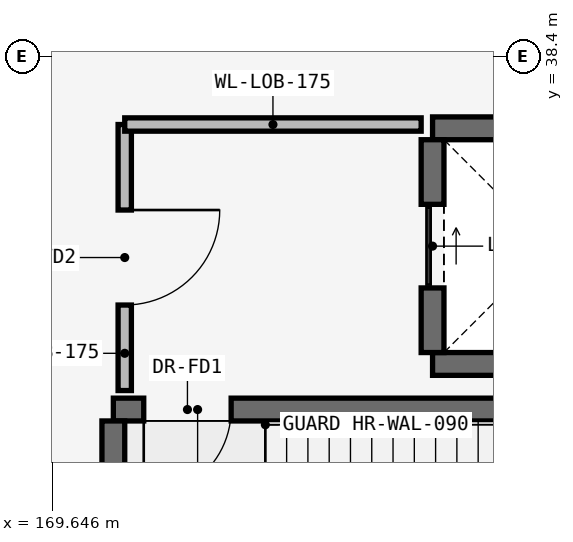
"""IFC4 building model, lengths in metres.
Left out: names, types, materials, properties, quantities, classifications, styles, units other than length and angle.
Written with IfcOpenShell. Run it as: python <this file> out.ifc"""

import sys

from ifc_helpers import new_model, si_unit, direction, frame, frame_2d, origin, place, context, subcontext, project, spatial, rectangle, extrude, element, fill, save


model = new_model("IFC4")
c1 = context("Model", 3, precision=1e-05, world=origin(), true_north=direction((0.0, 1.0)))
c2 = subcontext(c1, "Body", "Model", "MODEL_VIEW")
j1 = project(units=[si_unit("LENGTHUNIT", "METRE"), si_unit("PLANEANGLEUNIT", "RADIAN")], contexts=[c1])
p1 = place(None, origin())
s1 = spatial("IfcSite", under=j1, at=p1, CompositionType="ELEMENT")
p2 = place(p1, origin())
s2 = spatial("IfcBuilding", under=s1, at=p2, CompositionType="ELEMENT")
p3 = place(p2, origin())
s3 = spatial("IfcBuildingStorey", under=s2, at=p3, CompositionType="ELEMENT", Elevation=0.0)
p4 = place(p3, frame((170.45, 33.75, 0.0), z_axis=(0.0, 0.0, 1.0), x_axis=(1.0, 0.0, 0.0)))
e1 = element("IfcWall", 1, at=p4, inside=s3, PredefinedType="SHEAR", context=c2, shape_type="SweptSolid", body=[
    extrude(rectangle(XDim=7.92, YDim=0.3, at=frame_2d((3.96, 0.0))), origin(), (0.0, 0.0, 1.0), 5.08),
])
p5 = place(p4, frame((0.4, 0.0, 0.0)))
e2 = element("IfcOpeningElement", 2, at=p5, cuts=e1, PredefinedType="OPENING", context=c2, shape_type="SweptSolid", body=[
    extrude(rectangle(XDim=1.15, YDim=2.15, at=frame_2d((0.575, 1.075))), frame((0.0, 0.165, 0.0), z_axis=(0.0, -1.0, 0.0), x_axis=(1.0, 0.0, 0.0)), (0.0, 0.0, 1.0), 0.33),
])
p6 = place(p3, frame((170.45, 29.7, 0.0), z_axis=(0.0, 0.0, 1.0), x_axis=(0.0, 1.0, 0.0)))
e3 = element("IfcWall", 3, at=p6, inside=s3, PredefinedType="SHEAR", context=c2, shape_type="SweptSolid", body=[
    extrude(rectangle(XDim=3.9, YDim=0.3, at=frame_2d((1.95, 0.0))), origin(), (0.0, 0.0, 1.0), 5.08),
])
for number, where, z_axis, x_axis in (
    (4, (174.65, 34.35, 0.0), (0.0, 0.0, 1.0), (1.0, 0.0, 0.0)),
    (5, (174.65, 37.45, 0.0), (0.0, 0.0, 1.0), (1.0, 0.0, 0.0)),
):
    element("IfcWall", number, at=place(p3, frame(where, z_axis=z_axis, x_axis=x_axis)), inside=s3, PredefinedType="SHEAR", context=c2, shape_type="SweptSolid", body=[
        extrude(rectangle(XDim=3.1, YDim=0.3, at=frame_2d((1.55, 0.0))), origin(), (0.0, 0.0, 1.0), 5.08),
    ])
p7 = place(p3, frame((174.65, 34.5, 0.0), z_axis=(0.0, 0.0, 1.0), x_axis=(0.0, 1.0, 0.0)))
e6 = element("IfcWall", 6, at=p7, inside=s3, PredefinedType="SHEAR", context=c2, shape_type="SweptSolid", body=[
    extrude(rectangle(XDim=2.8, YDim=0.3, at=frame_2d((1.4, 0.0))), origin(), (0.0, 0.0, 1.0), 5.08),
])
p8 = place(p7, frame((0.85, 0.0, 0.0)))
e7 = element("IfcOpeningElement", 7, at=p8, cuts=e6, PredefinedType="OPENING", context=c2, shape_type="SweptSolid", body=[
    extrude(rectangle(XDim=1.1, YDim=2.15, at=frame_2d((0.55, 1.075))), frame((0.0, 0.165, 0.0), z_axis=(0.0, -1.0, 0.0), x_axis=(1.0, 0.0, 0.0)), (0.0, 0.0, 1.0), 0.33),
])
p9 = place(p3, frame((170.6, 34.0, 0.0), z_axis=(0.0, 0.0, 1.0), x_axis=(0.0, 1.0, 0.0)))
e8 = element("IfcWall", 8, at=p9, inside=s3, PredefinedType="PARTITIONING", context=c2, shape_type="SweptSolid", body=[
    extrude(rectangle(XDim=3.5, YDim=0.175, at=frame_2d((1.75, 0.0))), origin(), (0.0, 0.0, 1.0), 5.08),
])
p10 = place(p9, frame((1.125, 0.0, 0.0)))
e9 = element("IfcOpeningElement", 9, at=p10, cuts=e8, PredefinedType="OPENING", context=c2, shape_type="SweptSolid", body=[
    extrude(rectangle(XDim=1.25, YDim=2.2, at=frame_2d((0.625, 1.1))), frame((0.0, 0.103, 0.0), z_axis=(0.0, -1.0, 0.0), x_axis=(1.0, 0.0, 0.0)), (0.0, 0.0, 1.0), 0.205),
])
p11 = place(p3, frame((170.6, 37.5, 0.0), z_axis=(0.0, 0.0, 1.0), x_axis=(1.0, 0.0, 0.0)))
e10 = element("IfcWall", 10, at=p11, inside=s3, PredefinedType="PARTITIONING", context=c2, shape_type="SweptSolid", body=[
    extrude(rectangle(XDim=3.9, YDim=0.175, at=frame_2d((1.95, 0.0))), origin(), (0.0, 0.0, 1.0), 5.08),
])
p12 = place(p5, origin())
e11 = element("IfcDoor", 11, at=p12, inside=s3, OperationType="SINGLE_SWING_LEFT", PredefinedType="DOOR", context=c2, shape_type="SweptSolid", body=[
    extrude(rectangle(XDim=1.15, YDim=2.15, at=frame_2d((0.575, 1.075))), frame((0.0, 0.025, 0.0), z_axis=(0.0, -1.0, 0.0), x_axis=(1.0, 0.0, 0.0)), (0.0, 0.0, 1.0), 0.05),
])
fill(e2, e11)
p13 = place(p8, origin())
e12 = element("IfcDoor", 12, at=p13, inside=s3, OperationType="SLIDING_TO_LEFT", PredefinedType="DOOR", context=c2, shape_type="SweptSolid", body=[
    extrude(rectangle(XDim=1.1, YDim=2.15, at=frame_2d((0.55, 1.075))), frame((0.0, 0.025, 0.0), z_axis=(0.0, -1.0, 0.0), x_axis=(1.0, 0.0, 0.0)), (0.0, 0.0, 1.0), 0.05),
])
fill(e7, e12)
p14 = place(p10, frame((1.25, 0.0, 0.0), z_axis=(0.0, 0.0, 1.0), x_axis=(-1.0, 0.0, 0.0)))
e13 = element("IfcDoor", 13, at=p14, inside=s3, OperationType="SINGLE_SWING_RIGHT", PredefinedType="DOOR", context=c2, shape_type="SweptSolid", body=[
    extrude(rectangle(XDim=1.25, YDim=2.2, at=frame_2d((0.625, 1.1))), frame((0.0, 0.025, 0.0), z_axis=(0.0, -1.0, 0.0), x_axis=(1.0, 0.0, 0.0)), (0.0, 0.0, 1.0), 0.05),
])
fill(e9, e13)
save(model, sys.argv[1])
